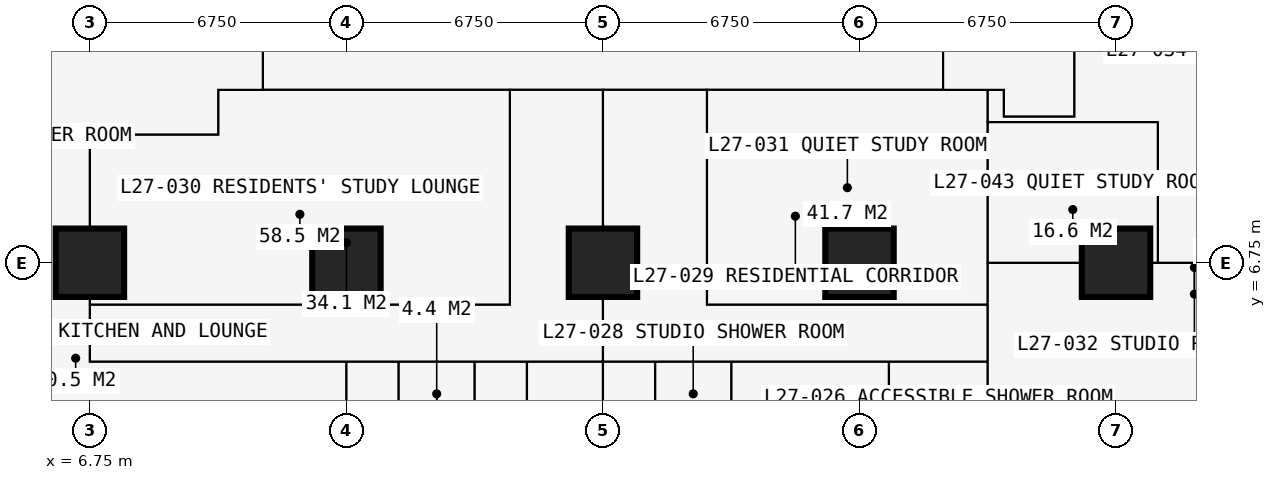
"""IFC4 building model, lengths in metres.
Left out: names, types, materials, properties, quantities, classifications, styles, units other than length and angle.
Written with IfcOpenShell. Run it as: python <this file> out.ifc"""

import sys

from ifc_helpers import new_model, si_unit, direction, frame, frame_2d, origin, origin_2d, place, context, subcontext, project, spatial, rectangle, extrude, element, fill, save


model = new_model("IFC4")
c1 = context("Model", 3, precision=1e-05, world=origin(), true_north=direction((0.0, 1.0)))
c2 = subcontext(c1, "Body", "Model", "MODEL_VIEW")
j1 = project(units=[si_unit("LENGTHUNIT", "METRE"), si_unit("PLANEANGLEUNIT", "RADIAN")], contexts=[c1])
p1 = place(None, origin())
s1 = spatial("IfcSite", under=j1, at=p1, CompositionType="ELEMENT")
p2 = place(p1, origin())
s2 = spatial("IfcBuilding", under=s1, at=p2, CompositionType="ELEMENT")
p3 = place(p2, frame((0.0, 0.0, 101.7)))
s3 = spatial("IfcBuildingStorey", under=s2, at=p3, CompositionType="ELEMENT", Elevation=101.7)
for number, where, z_axis, x_axis in (
    (1, (6.75, 6.75, 0.0), (0.0, 0.0, 1.0), (1.0, 0.0, 0.0)),
    (2, (13.5, 6.75, 0.0), (0.0, 0.0, 1.0), (1.0, 0.0, 0.0)),
    (3, (20.25, 6.75, 0.0), (0.0, 0.0, 1.0), (1.0, 0.0, 0.0)),
    (4, (27.0, 6.75, 0.0), (0.0, 0.0, 1.0), (1.0, 0.0, 0.0)),
    (5, (33.75, 6.75, 0.0), (0.0, 0.0, 1.0), (1.0, 0.0, 0.0)),
):
    element("IfcColumn", number, at=place(p3, frame(where, z_axis=z_axis, x_axis=x_axis)), inside=s3, PredefinedType="COLUMN", context=c2, shape_type="SweptSolid", body=[
        extrude(rectangle(XDim=1.8, YDim=1.8, at=origin_2d()), origin(), (0.0, 0.0, 1.0), 3.6),
    ])
p4 = place(p3, frame((-0.734, 10.125, 0.0), z_axis=(0.0, 0.0, 1.0), x_axis=(1.0, 0.0, 0.0)))
e6 = element("IfcWall", 6, at=p4, inside=s3, PredefinedType="PARTITIONING", context=c2, shape_type="SweptSolid", body=[
    extrude(rectangle(XDim=10.859, YDim=0.15, at=frame_2d((5.429, 0.0))), origin(), (0.0, 0.0, 1.0), 3.375),
])
p5 = place(p3, frame((6.75, 4.15, 0.0), z_axis=(0.0, 0.0, 1.0), x_axis=(0.0, 1.0, 0.0)))
e7 = element("IfcWall", 7, at=p5, inside=s3, PredefinedType="PARTITIONING", context=c2, shape_type="SweptSolid", body=[
    extrude(rectangle(XDim=5.975, YDim=0.15, at=frame_2d((2.988, 0.0))), origin(), (0.0, 0.0, 1.0), 2.877),
])
p6 = place(p3, frame((6.75, 4.15, 0.0), z_axis=(0.0, 0.0, 1.0), x_axis=(1.0, 0.0, 0.0)))
e8 = element("IfcWall", 8, at=p6, inside=s3, PredefinedType="PARTITIONING", context=c2, shape_type="SweptSolid", body=[
    extrude(rectangle(XDim=23.625, YDim=0.1, at=frame_2d((11.812, 0.0))), origin(), (0.0, 0.0, 1.0), 3.375),
])
p7 = place(p6, frame((2.85, 0.0, 0.0)))
e9 = element("IfcOpeningElement", 9, at=p7, cuts=e8, PredefinedType="OPENING", context=c2, shape_type="SweptSolid", body=[
    extrude(rectangle(XDim=1.0, YDim=2.2, at=frame_2d((0.5, 1.1))), frame((0.0, 0.06, 0.0), z_axis=(0.0, -1.0, 0.0), x_axis=(1.0, 0.0, 0.0)), (0.0, 0.0, 1.0), 0.12),
])
p8 = place(p6, frame((6.95, 0.0, 0.0)))
e10 = element("IfcOpeningElement", 10, at=p8, cuts=e8, PredefinedType="OPENING", context=c2, shape_type="SweptSolid", body=[
    extrude(rectangle(XDim=0.95, YDim=2.2, at=frame_2d((0.475, 1.1))), frame((0.0, 0.06, 0.0), z_axis=(0.0, -1.0, 0.0), x_axis=(1.0, 0.0, 0.0)), (0.0, 0.0, 1.0), 0.12),
])
p9 = place(p6, frame((10.375, 0.0, 0.0)))
e11 = element("IfcOpeningElement", 11, at=p9, cuts=e8, PredefinedType="OPENING", context=c2, shape_type="SweptSolid", body=[
    extrude(rectangle(XDim=0.95, YDim=2.2, at=frame_2d((0.475, 1.1))), frame((0.0, 0.06, 0.0), z_axis=(0.0, -1.0, 0.0), x_axis=(1.0, 0.0, 0.0)), (0.0, 0.0, 1.0), 0.12),
])
p10 = place(p6, frame((18.475, 0.0, 0.0)))
e12 = element("IfcOpeningElement", 12, at=p10, cuts=e8, PredefinedType="OPENING", context=c2, shape_type="SweptSolid", body=[
    extrude(rectangle(XDim=0.95, YDim=2.2, at=frame_2d((0.475, 1.1))), frame((0.0, 0.06, 0.0), z_axis=(0.0, -1.0, 0.0), x_axis=(1.0, 0.0, 0.0)), (0.0, 0.0, 1.0), 0.12),
])
p11 = place(p6, frame((13.7, 0.0, 0.0)))
e13 = element("IfcOpeningElement", 13, at=p11, cuts=e8, PredefinedType="OPENING", context=c2, shape_type="SweptSolid", body=[
    extrude(rectangle(XDim=0.95, YDim=2.2, at=frame_2d((0.475, 1.1))), frame((0.0, 0.06, 0.0), z_axis=(0.0, -1.0, 0.0), x_axis=(1.0, 0.0, 0.0)), (0.0, 0.0, 1.0), 0.12),
])
p12 = place(p3, frame((6.75, 5.65, 0.0), z_axis=(0.0, 0.0, 1.0), x_axis=(1.0, 0.0, 0.0)))
e14 = element("IfcWall", 14, at=p12, inside=s3, PredefinedType="PARTITIONING", context=c2, shape_type="SweptSolid", body=[
    extrude(rectangle(XDim=11.05, YDim=0.15, at=frame_2d((5.525, 0.0))), origin(), (0.0, 0.0, 1.0), 3.375),
])
p13 = place(p3, frame((10.125, 10.125, 0.0), z_axis=(0.0, 0.0, 1.0), x_axis=(0.0, 1.0, 0.0)))
e15 = element("IfcWall", 15, at=p13, inside=s3, PredefinedType="PARTITIONING", context=c2, shape_type="SweptSolid", body=[
    extrude(rectangle(XDim=1.175, YDim=0.15, at=frame_2d((0.587, 0.0))), origin(), (0.0, 0.0, 1.0), 3.375),
])
p14 = place(p3, frame((10.125, 11.3, 0.0), z_axis=(0.0, 0.0, 1.0), x_axis=(1.0, 0.0, 0.0)))
e16 = element("IfcWall", 16, at=p14, inside=s3, PredefinedType="PARTITIONING", context=c2, shape_type="SweptSolid", body=[
    extrude(rectangle(XDim=20.675, YDim=0.15, at=frame_2d((10.337, 0.0))), origin(), (0.0, 0.0, 1.0), 3.375),
])
p15 = place(p14, frame((8.375, 0.0, 0.0)))
e17 = element("IfcOpeningElement", 17, at=p15, cuts=e16, PredefinedType="OPENING", context=c2, shape_type="SweptSolid", body=[
    extrude(rectangle(XDim=1.0, YDim=2.2, at=frame_2d((0.5, 1.1))), frame((0.0, 0.085, 0.0), z_axis=(0.0, -1.0, 0.0), x_axis=(1.0, 0.0, 0.0)), (0.0, 0.0, 1.0), 0.17),
])
p16 = place(p14, frame((10.975, 0.0, 0.0)))
e18 = element("IfcOpeningElement", 18, at=p16, cuts=e16, PredefinedType="OPENING", context=c2, shape_type="SweptSolid", body=[
    extrude(rectangle(XDim=1.0, YDim=2.2, at=frame_2d((0.5, 1.1))), frame((0.0, 0.085, 0.0), z_axis=(0.0, -1.0, 0.0), x_axis=(1.0, 0.0, 0.0)), (0.0, 0.0, 1.0), 0.17),
])
p17 = place(p14, frame((3.925, 0.0, 0.0)))
e19 = element("IfcOpeningElement", 19, at=p17, cuts=e16, PredefinedType="OPENING", context=c2, shape_type="SweptSolid", body=[
    extrude(rectangle(XDim=0.95, YDim=2.2, at=frame_2d((0.475, 1.1))), frame((0.0, 0.085, 0.0), z_axis=(0.0, -1.0, 0.0), x_axis=(1.0, 0.0, 0.0)), (0.0, 0.0, 1.0), 0.17),
])
p18 = place(p3, frame((11.3, 11.3, 0.0), z_axis=(0.0, 0.0, 1.0), x_axis=(0.0, 1.0, 0.0)))
e20 = element("IfcWall", 20, at=p18, inside=s3, PredefinedType="PARTITIONING", context=c2, shape_type="SweptSolid", body=[
    extrude(rectangle(XDim=19.3, YDim=0.15, at=frame_2d((9.65, 0.0))), origin(), (0.0, 0.0, 1.0), 3.375),
])
p19 = place(p18, frame((13.525, 0.0, 0.0)))
e21 = element("IfcOpeningElement", 21, at=p19, cuts=e20, PredefinedType="OPENING", context=c2, shape_type="SweptSolid", body=[
    extrude(rectangle(XDim=1.0, YDim=2.2, at=frame_2d((0.5, 1.1))), frame((0.0, 0.085, 0.0), z_axis=(0.0, -1.0, 0.0), x_axis=(1.0, 0.0, 0.0)), (0.0, 0.0, 1.0), 0.17),
])
p20 = place(p18, frame((10.438, 0.0, 0.0)))
e22 = element("IfcOpeningElement", 22, at=p20, cuts=e20, PredefinedType="OPENING", context=c2, shape_type="SweptSolid", body=[
    extrude(rectangle(XDim=1.0, YDim=2.2, at=frame_2d((0.5, 1.1))), frame((0.0, 0.085, 0.0), z_axis=(0.0, -1.0, 0.0), x_axis=(1.0, 0.0, 0.0)), (0.0, 0.0, 1.0), 0.17),
])
p21 = place(p3, frame((13.5, -0.734, 0.0), z_axis=(0.0, 0.0, 1.0), x_axis=(0.0, 1.0, 0.0)))
e23 = element("IfcWall", 23, at=p21, inside=s3, PredefinedType="PARTITIONING", context=c2, shape_type="SweptSolid", body=[
    extrude(rectangle(XDim=4.884, YDim=0.15, at=frame_2d((2.442, 0.0))), origin(), (0.0, 0.0, 1.0), 2.877),
])
p22 = place(p3, frame((14.875, 1.95, 0.0), z_axis=(0.0, 0.0, 1.0), x_axis=(0.0, 1.0, 0.0)))
e24 = element("IfcWall", 24, at=p22, inside=s3, PredefinedType="PARTITIONING", context=c2, shape_type="SweptSolid", body=[
    extrude(rectangle(XDim=2.2, YDim=0.1, at=frame_2d((1.1, 0.0))), origin(), (0.0, 0.0, 1.0), 3.375),
])
p23 = place(p22, frame((0.65, 0.0, 0.0)))
e25 = element("IfcOpeningElement", 25, at=p23, cuts=e24, PredefinedType="OPENING", context=c2, shape_type="SweptSolid", body=[
    extrude(rectangle(XDim=0.9, YDim=2.2, at=frame_2d((0.45, 1.1))), frame((0.0, 0.06, 0.0), z_axis=(0.0, -1.0, 0.0), x_axis=(1.0, 0.0, 0.0)), (0.0, 0.0, 1.0), 0.12),
])
p24 = place(p3, frame((16.875, -0.734, 0.0), z_axis=(0.0, 0.0, 1.0), x_axis=(0.0, 1.0, 0.0)))
e26 = element("IfcWall", 26, at=p24, inside=s3, PredefinedType="PARTITIONING", context=c2, shape_type="SweptSolid", body=[
    extrude(rectangle(XDim=4.884, YDim=0.175, at=frame_2d((2.442, 0.0))), origin(), (0.0, 0.0, 1.0), 3.375),
])
p25 = place(p3, frame((17.8, 5.65, 0.0), z_axis=(0.0, 0.0, 1.0), x_axis=(0.0, 1.0, 0.0)))
e27 = element("IfcWall", 27, at=p25, inside=s3, PredefinedType="PARTITIONING", context=c2, shape_type="SweptSolid", body=[
    extrude(rectangle(XDim=5.65, YDim=0.15, at=frame_2d((2.825, 0.0))), origin(), (0.0, 0.0, 1.0), 3.375),
])
p26 = place(p3, frame((18.25, 1.95, 0.0), z_axis=(0.0, 0.0, 1.0), x_axis=(0.0, 1.0, 0.0)))
e28 = element("IfcWall", 28, at=p26, inside=s3, PredefinedType="PARTITIONING", context=c2, shape_type="SweptSolid", body=[
    extrude(rectangle(XDim=2.2, YDim=0.1, at=frame_2d((1.1, 0.0))), origin(), (0.0, 0.0, 1.0), 3.375),
])
p27 = place(p26, frame((0.65, 0.0, 0.0)))
e29 = element("IfcOpeningElement", 29, at=p27, cuts=e28, PredefinedType="OPENING", context=c2, shape_type="SweptSolid", body=[
    extrude(rectangle(XDim=0.9, YDim=2.2, at=frame_2d((0.45, 1.1))), frame((0.0, 0.06, 0.0), z_axis=(0.0, -1.0, 0.0), x_axis=(1.0, 0.0, 0.0)), (0.0, 0.0, 1.0), 0.12),
])
p28 = place(p3, frame((20.25, -0.734, 0.0), z_axis=(0.0, 0.0, 1.0), x_axis=(0.0, 1.0, 0.0)))
e30 = element("IfcWall", 30, at=p28, inside=s3, PredefinedType="PARTITIONING", context=c2, shape_type="SweptSolid", body=[
    extrude(rectangle(XDim=12.034, YDim=0.15, at=frame_2d((6.017, 0.0))), origin(), (0.0, 0.0, 1.0), 2.61),
])
p29 = place(p3, frame((21.625, 1.95, 0.0), z_axis=(0.0, 0.0, 1.0), x_axis=(0.0, 1.0, 0.0)))
e31 = element("IfcWall", 31, at=p29, inside=s3, PredefinedType="PARTITIONING", context=c2, shape_type="SweptSolid", body=[
    extrude(rectangle(XDim=2.2, YDim=0.1, at=frame_2d((1.1, 0.0))), origin(), (0.0, 0.0, 1.0), 3.375),
])
p30 = place(p3, frame((22.988, 5.65, 0.0), z_axis=(0.0, 0.0, 1.0), x_axis=(1.0, 0.0, 0.0)))
e32 = element("IfcWall", 32, at=p30, inside=s3, PredefinedType="PARTITIONING", context=c2, shape_type="SweptSolid", body=[
    extrude(rectangle(XDim=7.387, YDim=0.15, at=frame_2d((3.694, 0.0))), origin(), (0.0, 0.0, 1.0), 3.375),
])
p31 = place(p30, frame((2.15, 0.0, 0.0)))
e33 = element("IfcOpeningElement", 33, at=p31, cuts=e32, PredefinedType="OPENING", context=c2, shape_type="SweptSolid", body=[
    extrude(rectangle(XDim=0.95, YDim=2.2, at=frame_2d((0.475, 1.1))), frame((0.0, 0.085, 0.0), z_axis=(0.0, -1.0, 0.0), x_axis=(1.0, 0.0, 0.0)), (0.0, 0.0, 1.0), 0.17),
])
p32 = place(p3, frame((22.988, 5.65, 0.0), z_axis=(0.0, 0.0, 1.0), x_axis=(0.0, 1.0, 0.0)))
e34 = element("IfcWall", 34, at=p32, inside=s3, PredefinedType="PARTITIONING", context=c2, shape_type="SweptSolid", body=[
    extrude(rectangle(XDim=5.65, YDim=0.15, at=frame_2d((2.825, 0.0))), origin(), (0.0, 0.0, 1.0), 3.375),
])
p33 = place(p3, frame((23.625, -0.734, 0.0), z_axis=(0.0, 0.0, 1.0), x_axis=(0.0, 1.0, 0.0)))
e35 = element("IfcWall", 35, at=p33, inside=s3, PredefinedType="PARTITIONING", context=c2, shape_type="SweptSolid", body=[
    extrude(rectangle(XDim=4.884, YDim=0.175, at=frame_2d((2.442, 0.0))), origin(), (0.0, 0.0, 1.0), 3.375),
])
p34 = place(p33, frame((3.334, 0.0, 0.0)))
e36 = element("IfcOpeningElement", 36, at=p34, cuts=e35, PredefinedType="OPENING", context=c2, shape_type="SweptSolid", body=[
    extrude(rectangle(XDim=0.9, YDim=2.2, at=frame_2d((0.45, 1.1))), frame((0.0, 0.097, 0.0), z_axis=(0.0, -1.0, 0.0), x_axis=(1.0, 0.0, 0.0)), (0.0, 0.0, 1.0), 0.195),
])
p35 = place(p3, frame((27.775, 1.75, 0.0), z_axis=(0.0, 0.0, 1.0), x_axis=(0.0, 1.0, 0.0)))
e37 = element("IfcWall", 37, at=p35, inside=s3, PredefinedType="PARTITIONING", context=c2, shape_type="SweptSolid", body=[
    extrude(rectangle(XDim=2.4, YDim=0.1, at=frame_2d((1.2, 0.0))), origin(), (0.0, 0.0, 1.0), 3.375),
])
p36 = place(p3, frame((29.2, 11.3, 0.0), z_axis=(0.0, 0.0, 1.0), x_axis=(0.0, 1.0, 0.0)))
e38 = element("IfcWall", 38, at=p36, inside=s3, PredefinedType="PARTITIONING", context=c2, shape_type="SweptSolid", body=[
    extrude(rectangle(XDim=17.9, YDim=0.2, at=frame_2d((8.95, 0.0))), origin(), (0.0, 0.0, 1.0), 3.375),
])
p37 = place(p36, frame((8.35, 0.0, 0.0)))
e39 = element("IfcOpeningElement", 39, at=p37, cuts=e38, PredefinedType="OPENING", context=c2, shape_type="SweptSolid", body=[
    extrude(rectangle(XDim=1.2, YDim=2.2, at=frame_2d((0.6, 1.1))), frame((0.0, 0.11, 0.0), z_axis=(0.0, -1.0, 0.0), x_axis=(1.0, 0.0, 0.0)), (0.0, 0.0, 1.0), 0.22),
])
p38 = place(p3, frame((30.375, -0.734, 0.0), z_axis=(0.0, 0.0, 1.0), x_axis=(0.0, 1.0, 0.0)))
e40 = element("IfcWall", 40, at=p38, inside=s3, PredefinedType="PARTITIONING", context=c2, shape_type="SweptSolid", body=[
    extrude(rectangle(XDim=12.034, YDim=0.15, at=frame_2d((6.017, 0.0))), origin(), (0.0, 0.0, 1.0), 3.375),
])
p39 = place(p38, frame((5.134, 0.0, 0.0)))
e41 = element("IfcOpeningElement", 41, at=p39, cuts=e40, PredefinedType="OPENING", context=c2, shape_type="SweptSolid", body=[
    extrude(rectangle(XDim=1.0, YDim=2.2, at=frame_2d((0.5, 1.1))), frame((0.0, 0.085, 0.0), z_axis=(0.0, -1.0, 0.0), x_axis=(1.0, 0.0, 0.0)), (0.0, 0.0, 1.0), 0.17),
])
p40 = place(p3, frame((30.375, 6.75, 0.0), z_axis=(0.0, 0.0, 1.0), x_axis=(1.0, 0.0, 0.0)))
e42 = element("IfcWall", 42, at=p40, inside=s3, PredefinedType="PARTITIONING", context=c2, shape_type="SweptSolid", body=[
    extrude(rectangle(XDim=5.975, YDim=0.15, at=frame_2d((2.988, 0.0))), origin(), (0.0, 0.0, 1.0), 2.877),
])
p41 = place(p3, frame((30.375, 10.45, 0.0), z_axis=(0.0, 0.0, 1.0), x_axis=(1.0, 0.0, 0.0)))
e43 = element("IfcWall", 43, at=p41, inside=s3, PredefinedType="PARTITIONING", context=c2, shape_type="SweptSolid", body=[
    extrude(rectangle(XDim=4.475, YDim=0.15, at=frame_2d((2.238, 0.0))), origin(), (0.0, 0.0, 1.0), 3.375),
])
p42 = place(p41, frame((2.35, 0.0, 0.0)))
e44 = element("IfcOpeningElement", 44, at=p42, cuts=e43, PredefinedType="OPENING", context=c2, shape_type="SweptSolid", body=[
    extrude(rectangle(XDim=0.95, YDim=2.2, at=frame_2d((0.475, 1.1))), frame((0.0, 0.085, 0.0), z_axis=(0.0, -1.0, 0.0), x_axis=(1.0, 0.0, 0.0)), (0.0, 0.0, 1.0), 0.17),
])
p43 = place(p3, frame((30.8, 10.6, 0.0), z_axis=(0.0, 0.0, 1.0), x_axis=(0.0, 1.0, 0.0)))
e45 = element("IfcWall", 45, at=p43, inside=s3, PredefinedType="PARTITIONING", context=c2, shape_type="SweptSolid", body=[
    extrude(rectangle(XDim=0.7, YDim=0.15, at=frame_2d((0.35, 0.0))), origin(), (0.0, 0.0, 1.0), 3.375),
])
p44 = place(p3, frame((30.8, 10.6, 0.0), z_axis=(0.0, 0.0, 1.0), x_axis=(1.0, 0.0, 0.0)))
e46 = element("IfcWall", 46, at=p44, inside=s3, PredefinedType="PARTITIONING", context=c2, shape_type="SweptSolid", body=[
    extrude(rectangle(XDim=1.85, YDim=0.15, at=frame_2d((0.925, 0.0))), origin(), (0.0, 0.0, 1.0), 3.375),
])
p45 = place(p3, frame((32.65, 10.6, 0.0), z_axis=(0.0, 0.0, 1.0), x_axis=(0.0, 1.0, 0.0)))
e47 = element("IfcWall", 47, at=p45, inside=s3, PredefinedType="SHEAR", context=c2, shape_type="SweptSolid", body=[
    extrude(rectangle(XDim=9.3, YDim=0.1, at=frame_2d((4.65, 0.0))), origin(), (0.0, 0.0, 1.0), 3.375),
])
p46 = place(p45, frame((0.5, 0.0, 0.0)))
e48 = element("IfcOpeningElement", 48, at=p46, cuts=e47, PredefinedType="OPENING", context=c2, shape_type="SweptSolid", body=[
    extrude(rectangle(XDim=1.0, YDim=2.2, at=frame_2d((0.5, 1.1))), frame((0.0, 0.06, 0.0), z_axis=(0.0, -1.0, 0.0), x_axis=(1.0, 0.0, 0.0)), (0.0, 0.0, 1.0), 0.12),
])
p47 = place(p3, frame((34.85, 6.75, 0.0), z_axis=(0.0, 0.0, 1.0), x_axis=(0.0, 1.0, 0.0)))
e49 = element("IfcWall", 49, at=p47, inside=s3, PredefinedType="PARTITIONING", context=c2, shape_type="SweptSolid", body=[
    extrude(rectangle(XDim=3.7, YDim=0.15, at=frame_2d((1.85, 0.0))), origin(), (0.0, 0.0, 1.0), 3.375),
])
p48 = place(p7, origin())
e50 = element("IfcDoor", 50, at=p48, inside=s3, OperationType="SINGLE_SWING_LEFT", PredefinedType="DOOR", context=c2, shape_type="SweptSolid", body=[
    extrude(rectangle(XDim=1.0, YDim=2.2, at=frame_2d((0.5, 1.1))), frame((0.0, 0.025, 0.0), z_axis=(0.0, -1.0, 0.0), x_axis=(1.0, 0.0, 0.0)), (0.0, 0.0, 1.0), 0.05),
])
fill(e9, e50)
p49 = place(p8, origin())
e51 = element("IfcDoor", 51, at=p49, inside=s3, OperationType="SINGLE_SWING_LEFT", PredefinedType="DOOR", context=c2, shape_type="SweptSolid", body=[
    extrude(rectangle(XDim=0.95, YDim=2.2, at=frame_2d((0.475, 1.1))), frame((0.0, 0.025, 0.0), z_axis=(0.0, -1.0, 0.0), x_axis=(1.0, 0.0, 0.0)), (0.0, 0.0, 1.0), 0.05),
])
fill(e10, e51)
p50 = place(p23, origin())
e52 = element("IfcDoor", 52, at=p50, inside=s3, OperationType="SINGLE_SWING_RIGHT", PredefinedType="DOOR", context=c2, shape_type="SweptSolid", body=[
    extrude(rectangle(XDim=0.9, YDim=2.2, at=frame_2d((0.45, 1.1))), frame((0.0, 0.025, 0.0), z_axis=(0.0, -1.0, 0.0), x_axis=(1.0, 0.0, 0.0)), (0.0, 0.0, 1.0), 0.05),
])
fill(e25, e52)
p51 = place(p9, origin())
e53 = element("IfcDoor", 53, at=p51, inside=s3, OperationType="SINGLE_SWING_LEFT", PredefinedType="DOOR", context=c2, shape_type="SweptSolid", body=[
    extrude(rectangle(XDim=0.95, YDim=2.2, at=frame_2d((0.475, 1.1))), frame((0.0, 0.025, 0.0), z_axis=(0.0, -1.0, 0.0), x_axis=(1.0, 0.0, 0.0)), (0.0, 0.0, 1.0), 0.05),
])
fill(e11, e53)
p52 = place(p27, origin())
e54 = element("IfcDoor", 54, at=p52, inside=s3, OperationType="SINGLE_SWING_RIGHT", PredefinedType="DOOR", context=c2, shape_type="SweptSolid", body=[
    extrude(rectangle(XDim=0.9, YDim=2.2, at=frame_2d((0.45, 1.1))), frame((0.0, 0.025, 0.0), z_axis=(0.0, -1.0, 0.0), x_axis=(1.0, 0.0, 0.0)), (0.0, 0.0, 1.0), 0.05),
])
fill(e29, e54)
p53 = place(p15, origin())
e55 = element("IfcDoor", 55, at=p53, inside=s3, OperationType="SINGLE_SWING_LEFT", PredefinedType="DOOR", context=c2, shape_type="SweptSolid", body=[
    extrude(rectangle(XDim=1.0, YDim=2.2, at=frame_2d((0.5, 1.1))), frame((0.0, 0.025, 0.0), z_axis=(0.0, -1.0, 0.0), x_axis=(1.0, 0.0, 0.0)), (0.0, 0.0, 1.0), 0.05),
])
fill(e17, e55)
p54 = place(p10, origin())
e56 = element("IfcDoor", 56, at=p54, inside=s3, OperationType="SINGLE_SWING_LEFT", PredefinedType="DOOR", context=c2, shape_type="SweptSolid", body=[
    extrude(rectangle(XDim=0.95, YDim=2.2, at=frame_2d((0.475, 1.1))), frame((0.0, 0.025, 0.0), z_axis=(0.0, -1.0, 0.0), x_axis=(1.0, 0.0, 0.0)), (0.0, 0.0, 1.0), 0.05),
])
fill(e12, e56)
p55 = place(p11, origin())
e57 = element("IfcDoor", 57, at=p55, inside=s3, OperationType="SINGLE_SWING_LEFT", PredefinedType="DOOR", context=c2, shape_type="SweptSolid", body=[
    extrude(rectangle(XDim=0.95, YDim=2.2, at=frame_2d((0.475, 1.1))), frame((0.0, 0.025, 0.0), z_axis=(0.0, -1.0, 0.0), x_axis=(1.0, 0.0, 0.0)), (0.0, 0.0, 1.0), 0.05),
])
fill(e13, e57)
p56 = place(p34, origin())
e58 = element("IfcDoor", 58, at=p56, inside=s3, OperationType="SINGLE_SWING_RIGHT", PredefinedType="DOOR", context=c2, shape_type="SweptSolid", body=[
    extrude(rectangle(XDim=0.9, YDim=2.2, at=frame_2d((0.45, 1.1))), frame((0.0, 0.025, 0.0), z_axis=(0.0, -1.0, 0.0), x_axis=(1.0, 0.0, 0.0)), (0.0, 0.0, 1.0), 0.05),
])
fill(e36, e58)
p57 = place(p16, origin())
e59 = element("IfcDoor", 59, at=p57, inside=s3, OperationType="SINGLE_SWING_LEFT", PredefinedType="DOOR", context=c2, shape_type="SweptSolid", body=[
    extrude(rectangle(XDim=1.0, YDim=2.2, at=frame_2d((0.5, 1.1))), frame((0.0, 0.025, 0.0), z_axis=(0.0, -1.0, 0.0), x_axis=(1.0, 0.0, 0.0)), (0.0, 0.0, 1.0), 0.05),
])
fill(e18, e59)
p58 = place(p17, origin())
e60 = element("IfcDoor", 60, at=p58, inside=s3, OperationType="SINGLE_SWING_LEFT", PredefinedType="DOOR", context=c2, shape_type="SweptSolid", body=[
    extrude(rectangle(XDim=0.95, YDim=2.2, at=frame_2d((0.475, 1.1))), frame((0.0, 0.025, 0.0), z_axis=(0.0, -1.0, 0.0), x_axis=(1.0, 0.0, 0.0)), (0.0, 0.0, 1.0), 0.05),
])
fill(e19, e60)
p59 = place(p31, origin())
e61 = element("IfcDoor", 61, at=p59, inside=s3, OperationType="SINGLE_SWING_LEFT", PredefinedType="DOOR", context=c2, shape_type="SweptSolid", body=[
    extrude(rectangle(XDim=0.95, YDim=2.2, at=frame_2d((0.475, 1.1))), frame((0.0, 0.025, 0.0), z_axis=(0.0, -1.0, 0.0), x_axis=(1.0, 0.0, 0.0)), (0.0, 0.0, 1.0), 0.05),
])
fill(e33, e61)
p60 = place(p39, origin())
e62 = element("IfcDoor", 62, at=p60, inside=s3, OperationType="SINGLE_SWING_LEFT", PredefinedType="DOOR", context=c2, shape_type="SweptSolid", body=[
    extrude(rectangle(XDim=1.0, YDim=2.2, at=frame_2d((0.5, 1.1))), frame((0.0, 0.025, 0.0), z_axis=(0.0, -1.0, 0.0), x_axis=(1.0, 0.0, 0.0)), (0.0, 0.0, 1.0), 0.05),
])
fill(e41, e62)
p61 = place(p46, origin())
e63 = element("IfcDoor", 63, at=p61, inside=s3, OperationType="SINGLE_SWING_LEFT", PredefinedType="DOOR", context=c2, shape_type="SweptSolid", body=[
    extrude(rectangle(XDim=1.0, YDim=2.2, at=frame_2d((0.5, 1.1))), frame((0.0, 0.025, 0.0), z_axis=(0.0, -1.0, 0.0), x_axis=(1.0, 0.0, 0.0)), (0.0, 0.0, 1.0), 0.05),
])
fill(e48, e63)
p62 = place(p42, origin())
e64 = element("IfcDoor", 64, at=p62, inside=s3, OperationType="SINGLE_SWING_LEFT", PredefinedType="DOOR", context=c2, shape_type="SweptSolid", body=[
    extrude(rectangle(XDim=0.95, YDim=2.2, at=frame_2d((0.475, 1.1))), frame((0.0, 0.025, 0.0), z_axis=(0.0, -1.0, 0.0), x_axis=(1.0, 0.0, 0.0)), (0.0, 0.0, 1.0), 0.05),
])
fill(e44, e64)
save(model, sys.argv[1])
